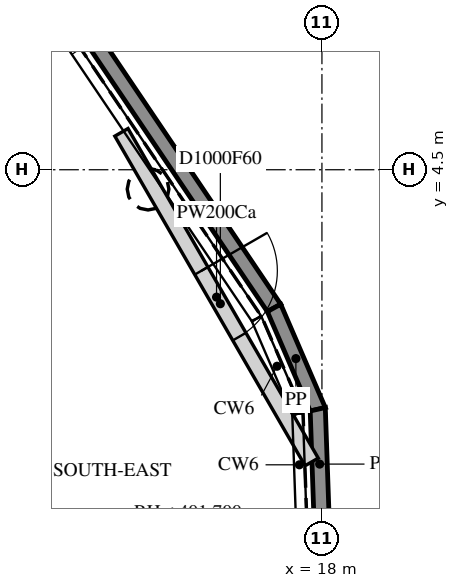
"""IFC4 building model, lengths in metres.
Left out: names, types, materials, properties, quantities, classifications, styles, units other than length and angle.
Written with IfcOpenShell. Run it as: python <this file> out.ifc"""

import sys

from ifc_helpers import new_model, si_unit, direction, frame, frame_2d, origin, place, context, subcontext, project, spatial, polyline, rectangle, outline, extrude, element, fill, save


model = new_model("IFC4")
c1 = context("Model", 3, precision=1e-05, world=origin(), true_north=direction((0.0, 1.0)))
c2 = subcontext(c1, "Body", "Model", "MODEL_VIEW")
j1 = project(units=[si_unit("LENGTHUNIT", "METRE"), si_unit("PLANEANGLEUNIT", "RADIAN")], contexts=[c1])
p1 = place(None, origin())
s1 = spatial("IfcSite", under=j1, at=p1, CompositionType="ELEMENT")
p2 = place(p1, origin())
s2 = spatial("IfcBuilding", under=s1, at=p2, CompositionType="ELEMENT")
p3 = place(p2, frame((0.0, 0.0, 397.2)))
s3 = spatial("IfcBuildingStorey", under=s2, at=p3, CompositionType="ELEMENT", Elevation=397.2)
p4 = place(p3, frame((9.618, 14.174, 4.5), z_axis=(0.0, 0.0, 1.0), x_axis=(0.559191500603, -0.8290385188, 0.0)))
e1 = element("IfcWall", 1, at=p4, inside=s3, PredefinedType="PARAPET", context=c2, shape_type="SweptSolid", body=[
    extrude(outline(polyline([(0.008, -0.1), (13.852, -0.1), (13.871, 0.1), (-0.008, 0.1), (0.008, -0.1)])), origin(), (0.0, 0.0, 1.0), 1.1),
])
p5 = place(p3, frame((17.37, 2.682, 4.5), z_axis=(0.0, 0.0, 1.0), x_axis=(0.396007748468, -0.918247168879, 0.0)))
e2 = element("IfcWall", 2, at=p5, inside=s3, PredefinedType="PARAPET", context=c2, shape_type="SweptSolid", body=[
    extrude(outline(polyline([(0.009, -0.1), (1.434, -0.1), (1.471, 0.1), (-0.009, 0.1), (0.009, -0.1)])), origin(), (0.0, 0.0, 1.0), 1.1),
])
p6 = place(p3, frame((17.945, 1.349, 4.5), z_axis=(0.0, 0.0, 1.0), x_axis=(0.035021671997, -0.999386553087, 0.0)))
e3 = element("IfcWall", 3, at=p6, inside=s3, PredefinedType="PARAPET", context=c2, shape_type="SweptSolid", body=[
    extrude(outline(polyline([(0.019, -0.1), (1.424, -0.1), (1.462, 0.1), (-0.019, 0.1), (0.019, -0.1)])), origin(), (0.0, 0.0, 1.0), 1.1),
])
p7 = place(p3, frame((15.362, 4.992, 0.0), z_axis=(0.0, 0.0, 1.0), x_axis=(0.499915218853, -0.866074346669, 0.0)))
e4 = element("IfcWall", 4, at=p7, inside=s3, PredefinedType="PARTITIONING", context=c2, shape_type="SweptSolid", body=[
    extrude(rectangle(XDim=5.007, YDim=0.2, at=frame_2d((2.503, 0.0))), origin(), (0.0, 0.0, 1.0), 4.3),
])
p8 = place(p7, frame((2.103, 0.0, 0.0)))
e5 = element("IfcOpeningElement", 5, at=p8, cuts=e4, PredefinedType="OPENING", context=c2, shape_type="SweptSolid", body=[
    extrude(rectangle(XDim=1.0, YDim=2.1, at=frame_2d((0.5, 1.05))), frame((0.0, 0.11, 0.0), z_axis=(0.0, -1.0, 0.0), x_axis=(1.0, 0.0, 0.0)), (0.0, 0.0, 1.0), 0.22),
])
p9 = place(p8, origin())
e6 = element("IfcDoor", 6, at=p9, inside=s3, OperationType="SINGLE_SWING_RIGHT", PredefinedType="DOOR", context=c2, shape_type="SweptSolid", body=[
    extrude(rectangle(XDim=1.0, YDim=2.1, at=frame_2d((0.5, 1.05))), frame((0.0, 0.025, 0.0), z_axis=(0.0, -1.0, 0.0), x_axis=(1.0, 0.0, 0.0)), (0.0, 0.0, 1.0), 0.05),
])
fill(e5, e6)
save(model, sys.argv[1])
